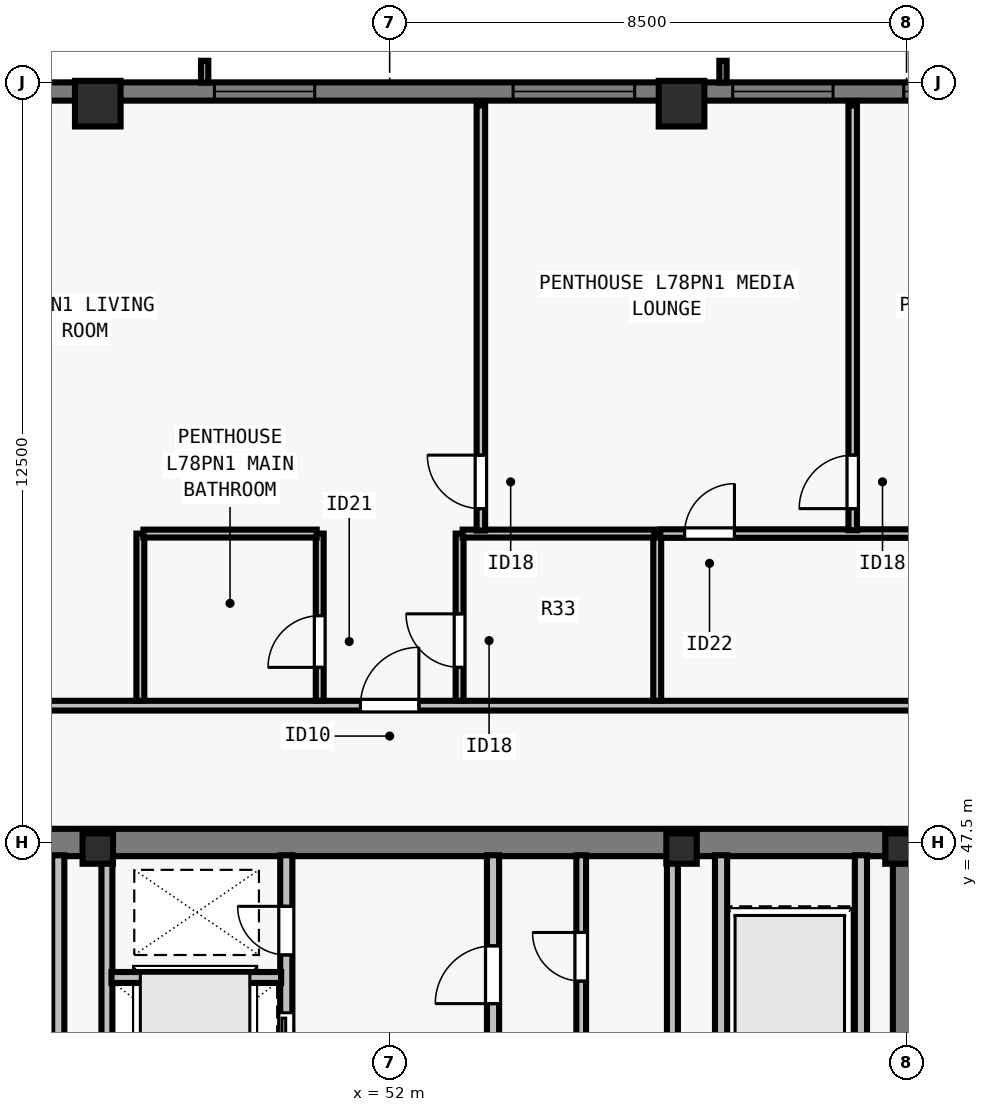
"""IFC4 building model, lengths in metres.
Left out: names, types, materials, properties, quantities, classifications, styles, units other than length and angle.
Written with IfcOpenShell. Run it as: python <this file> out.ifc"""

import sys

from ifc_helpers import new_model, si_unit, direction, frame, frame_2d, origin, origin_2d, place, context, subcontext, project, spatial, rectangle, i_section, extrude, element, fill, save


model = new_model("IFC4")
c1 = context("Model", 3, precision=1e-05, world=origin(), true_north=direction((0.0, 1.0)))
c2 = subcontext(c1, "Body", "Model", "MODEL_VIEW")
j1 = project(units=[si_unit("LENGTHUNIT", "METRE"), si_unit("PLANEANGLEUNIT", "RADIAN")], contexts=[c1])
p1 = place(None, origin())
s1 = spatial("IfcSite", under=j1, at=p1, CompositionType="ELEMENT")
p2 = place(p1, origin())
s2 = spatial("IfcBuilding", under=s1, at=p2, CompositionType="ELEMENT")
p3 = place(p2, frame((0.0, 0.0, 284.0)))
s3 = spatial("IfcBuildingStorey", under=s2, at=p3, CompositionType="ELEMENT", Elevation=284.0)
for number, where, z_axis, x_axis in (
    (1, (47.2, 47.4, 0.0), (0.0, 0.0, 1.0), (1.0, 0.0, 0.0)),
    (2, (56.8, 47.4, 0.0), (0.0, 0.0, 1.0), (1.0, 0.0, 0.0)),
    (3, (60.4, 47.4, 0.0), (0.0, 0.0, 1.0), (1.0, 0.0, 0.0)),
):
    element("IfcColumn", number, at=place(p3, frame(where, z_axis=z_axis, x_axis=x_axis)), inside=s3, PredefinedType="COLUMN", context=c2, shape_type="SweptSolid", body=[
        extrude(i_section(OverallWidth=0.5, OverallDepth=0.5, WebThickness=0.028, FlangeThickness=0.045, at=origin_2d()), origin(), (0.0, 0.0, 1.0), 3.5),
    ])
for number, where, z_axis, x_axis in (
    (4, (56.8, 59.65, 0.0), (0.0, 0.0, 1.0), (1.0, 0.0, 0.0)),
    (5, (47.2, 59.65, 0.0), (0.0, 0.0, 1.0), (1.0, 0.0, 0.0)),
):
    element("IfcColumn", number, at=place(p3, frame(where, z_axis=z_axis, x_axis=x_axis)), inside=s3, PredefinedType="COLUMN", context=c2, shape_type="SweptSolid", body=[
        extrude(rectangle(XDim=0.75, YDim=0.75, at=origin_2d()), origin(), (0.0, 0.0, 1.0), 3.5),
    ])
p4 = place(p3, frame((36.5, 59.85, 0.0), z_axis=(0.0, 0.0, 1.0), x_axis=(1.0, 0.0, 0.0)))
e6 = element("IfcWall", 6, at=p4, inside=s3, PredefinedType="SOLIDWALL", context=c2, shape_type="SweptSolid", body=[
    extrude(rectangle(XDim=30.722, YDim=0.3, at=frame_2d((15.361, 0.0))), origin(), (0.0, 0.0, 1.0), 3.29),
])
p5 = place(p4, frame((4.944, 0.0, 0.8)))
e7 = element("IfcOpeningElement", 7, at=p5, cuts=e6, PredefinedType="OPENING", context=c2, shape_type="SweptSolid", body=[
    extrude(rectangle(XDim=1.65, YDim=1.758, at=frame_2d((0.825, 0.879))), frame((0.0, 0.16, 0.0), z_axis=(0.0, -1.0, 0.0), x_axis=(1.0, 0.0, 0.0)), (0.0, 0.0, 1.0), 0.32),
])
p6 = place(p4, frame((7.756, 0.0, 0.8)))
e8 = element("IfcOpeningElement", 8, at=p6, cuts=e6, PredefinedType="OPENING", context=c2, shape_type="SweptSolid", body=[
    extrude(rectangle(XDim=2.0, YDim=1.758, at=frame_2d((1.0, 0.879))), frame((0.0, 0.16, 0.0), z_axis=(0.0, -1.0, 0.0), x_axis=(1.0, 0.0, 0.0)), (0.0, 0.0, 1.0), 0.32),
])
p7 = place(p4, frame((12.617, 0.0, 0.8)))
e9 = element("IfcOpeningElement", 9, at=p7, cuts=e6, PredefinedType="OPENING", context=c2, shape_type="SweptSolid", body=[
    extrude(rectangle(XDim=1.65, YDim=1.758, at=frame_2d((0.825, 0.879))), frame((0.0, 0.16, 0.0), z_axis=(0.0, -1.0, 0.0), x_axis=(1.0, 0.0, 0.0)), (0.0, 0.0, 1.0), 0.32),
])
p8 = place(p4, frame((17.53, 0.0, 0.8)))
e10 = element("IfcOpeningElement", 10, at=p8, cuts=e6, PredefinedType="OPENING", context=c2, shape_type="SweptSolid", body=[
    extrude(rectangle(XDim=2.0, YDim=1.758, at=frame_2d((1.0, 0.879))), frame((0.0, 0.16, 0.0), z_axis=(0.0, -1.0, 0.0), x_axis=(1.0, 0.0, 0.0)), (0.0, 0.0, 1.0), 0.32),
])
p9 = place(p4, frame((21.142, 0.0, 0.8)))
e11 = element("IfcOpeningElement", 11, at=p9, cuts=e6, PredefinedType="OPENING", context=c2, shape_type="SweptSolid", body=[
    extrude(rectangle(XDim=1.65, YDim=1.758, at=frame_2d((0.825, 0.879))), frame((0.0, 0.16, 0.0), z_axis=(0.0, -1.0, 0.0), x_axis=(1.0, 0.0, 0.0)), (0.0, 0.0, 1.0), 0.32),
])
p10 = place(p4, frame((23.954, 0.0, 0.8)))
e12 = element("IfcOpeningElement", 12, at=p10, cuts=e6, PredefinedType="OPENING", context=c2, shape_type="SweptSolid", body=[
    extrude(rectangle(XDim=2.0, YDim=1.758, at=frame_2d((1.0, 0.879))), frame((0.0, 0.16, 0.0), z_axis=(0.0, -1.0, 0.0), x_axis=(1.0, 0.0, 0.0)), (0.0, 0.0, 1.0), 0.32),
])
p11 = place(p3, frame((43.275, 47.5, 0.0), z_axis=(0.0, 0.0, 1.0), x_axis=(1.0, 0.0, 0.0)))
e13 = element("IfcWall", 13, at=p11, inside=s3, PredefinedType="SHEAR", context=c2, shape_type="SweptSolid", body=[
    extrude(rectangle(XDim=17.45, YDim=0.45, at=frame_2d((8.725, 0.0))), origin(), (0.0, 0.0, 1.0), 3.29),
])
p12 = place(p3, frame((60.5, 40.8, 0.0), z_axis=(0.0, 0.0, 1.0), x_axis=(0.0, 1.0, 0.0)))
e14 = element("IfcWall", 14, at=p12, inside=s3, PredefinedType="SHEAR", context=c2, shape_type="SweptSolid", body=[
    extrude(rectangle(XDim=6.485, YDim=0.45, at=frame_2d((3.242, 0.0))), origin(), (0.0, 0.0, 1.0), 3.29),
])
p13 = place(p3, frame((50.3, 40.585, 0.0), z_axis=(0.0, 0.0, 1.0), x_axis=(0.0, 1.0, 0.0)))
e15 = element("IfcWall", 15, at=p13, inside=s3, PredefinedType="SOLIDWALL", context=c2, shape_type="SweptSolid", body=[
    extrude(rectangle(XDim=6.705, YDim=0.2, at=frame_2d((3.353, 0.0))), origin(), (0.0, 0.0, 1.0), 3.29),
])
p14 = place(p13, frame((0.515, 0.0, 0.0)))
e16 = element("IfcOpeningElement", 16, at=p14, cuts=e15, PredefinedType="OPENING", context=c2, shape_type="SweptSolid", body=[
    extrude(rectangle(XDim=1.1, YDim=2.2, at=frame_2d((0.55, 1.1))), frame((0.0, 0.11, 0.0), z_axis=(0.0, -1.0, 0.0), x_axis=(1.0, 0.0, 0.0)), (0.0, 0.0, 1.0), 0.22),
])
p15 = place(p13, frame((3.015, 0.0, 0.0)))
e17 = element("IfcOpeningElement", 17, at=p15, cuts=e15, PredefinedType="OPENING", context=c2, shape_type="SweptSolid", body=[
    extrude(rectangle(XDim=1.1, YDim=2.2, at=frame_2d((0.55, 1.1))), frame((0.0, 0.11, 0.0), z_axis=(0.0, -1.0, 0.0), x_axis=(1.0, 0.0, 0.0)), (0.0, 0.0, 1.0), 0.22),
])
p16 = place(p13, frame((5.065, 0.0, 0.0)))
e18 = element("IfcOpeningElement", 18, at=p16, cuts=e15, PredefinedType="OPENING", context=c2, shape_type="SweptSolid", body=[
    extrude(rectangle(XDim=0.8, YDim=2.08, at=frame_2d((0.4, 1.04))), frame((0.0, 0.11, 0.0), z_axis=(0.0, -1.0, 0.0), x_axis=(1.0, 0.0, 0.0)), (0.0, 0.0, 1.0), 0.22),
])
p17 = place(p3, frame((53.7, 40.585, 0.0), z_axis=(0.0, 0.0, 1.0), x_axis=(0.0, 1.0, 0.0)))
e19 = element("IfcWall", 19, at=p17, inside=s3, PredefinedType="SOLIDWALL", context=c2, shape_type="SweptSolid", body=[
    extrude(rectangle(XDim=6.705, YDim=0.2, at=frame_2d((3.353, 0.0))), origin(), (0.0, 0.0, 1.0), 3.29),
])
p18 = place(p17, frame((0.195, 0.0, 0.0)))
e20 = element("IfcOpeningElement", 20, at=p18, cuts=e19, PredefinedType="OPENING", context=c2, shape_type="SweptSolid", body=[
    extrude(rectangle(XDim=0.8, YDim=2.08, at=frame_2d((0.4, 1.04))), frame((0.0, 0.11, 0.0), z_axis=(0.0, -1.0, 0.0), x_axis=(1.0, 0.0, 0.0)), (0.0, 0.0, 1.0), 0.22),
])
p19 = place(p17, frame((1.865, 0.0, 0.0)))
e21 = element("IfcOpeningElement", 21, at=p19, cuts=e19, PredefinedType="OPENING", context=c2, shape_type="SweptSolid", body=[
    extrude(rectangle(XDim=1.1, YDim=2.2, at=frame_2d((0.55, 1.1))), frame((0.0, 0.11, 0.0), z_axis=(0.0, -1.0, 0.0), x_axis=(1.0, 0.0, 0.0)), (0.0, 0.0, 1.0), 0.22),
])
p20 = place(p17, frame((4.265, 0.0, 0.0)))
e22 = element("IfcOpeningElement", 22, at=p20, cuts=e19, PredefinedType="OPENING", context=c2, shape_type="SweptSolid", body=[
    extrude(rectangle(XDim=0.95, YDim=2.12, at=frame_2d((0.475, 1.06))), frame((0.0, 0.11, 0.0), z_axis=(0.0, -1.0, 0.0), x_axis=(1.0, 0.0, 0.0)), (0.0, 0.0, 1.0), 0.22),
])
for number, where, z_axis, x_axis in (
    (23, (46.55, 43.735, 0.0), (0.0, 0.0, 1.0), (0.0, 1.0, 0.0)),
    (24, (57.45, 43.735, 0.0), (0.0, 0.0, 1.0), (0.0, 1.0, 0.0)),
    (25, (59.75, 43.735, 0.0), (0.0, 0.0, 1.0), (0.0, 1.0, 0.0)),
):
    element("IfcWall", number, at=place(p3, frame(where, z_axis=z_axis, x_axis=x_axis)), inside=s3, PredefinedType="SOLIDWALL", context=c2, shape_type="SweptSolid", body=[
        extrude(rectangle(XDim=3.555, YDim=0.2, at=frame_2d((1.777, 0.0))), origin(), (0.0, 0.0, 1.0), 3.29),
    ])
p21 = place(p3, frame((47.35, 43.735, 0.0), z_axis=(0.0, 0.0, 1.0), x_axis=(0.0, 1.0, 0.0)))
e26 = element("IfcWall", 26, at=p21, inside=s3, PredefinedType="SOLIDWALL", context=c2, shape_type="SweptSolid", body=[
    extrude(rectangle(XDim=3.555, YDim=0.18, at=frame_2d((1.777, 0.0))), origin(), (0.0, 0.0, 1.0), 3.29),
])
p22 = place(p3, frame((47.425, 45.28, 0.0), z_axis=(0.0, 0.0, 1.0), x_axis=(1.0, 0.0, 0.0)))
e27 = element("IfcWall", 27, at=p22, inside=s3, PredefinedType="SOLIDWALL", context=c2, shape_type="SweptSolid", body=[
    extrude(rectangle(XDim=2.79, YDim=0.18, at=frame_2d((1.395, 0.0))), origin(), (0.0, 0.0, 1.0), 3.29),
])
p23 = place(p3, frame((56.65, 43.735, 0.0), z_axis=(0.0, 0.0, 1.0), x_axis=(0.0, 1.0, 0.0)))
e28 = element("IfcWall", 28, at=p23, inside=s3, PredefinedType="SOLIDWALL", context=c2, shape_type="SweptSolid", body=[
    extrude(rectangle(XDim=3.555, YDim=0.18, at=frame_2d((1.777, 0.0))), origin(), (0.0, 0.0, 1.0), 3.29),
])
p24 = place(p3, frame((55.15, 44.195, 0.0), z_axis=(0.0, 0.0, 1.0), x_axis=(0.0, 1.0, 0.0)))
e29 = element("IfcWall", 29, at=p24, inside=s3, PredefinedType="PARTITIONING", context=c2, shape_type="SweptSolid", body=[
    extrude(rectangle(XDim=3.095, YDim=0.16, at=frame_2d((1.547, 0.0))), origin(), (0.0, 0.0, 1.0), 3.29),
])
p25 = place(p24, frame((1.025, 0.0, 0.0)))
e30 = element("IfcOpeningElement", 30, at=p25, cuts=e29, PredefinedType="OPENING", context=c2, shape_type="SweptSolid", body=[
    extrude(rectangle(XDim=0.8, YDim=2.1, at=frame_2d((0.4, 1.05))), frame((0.0, 0.09, 0.0), z_axis=(0.0, -1.0, 0.0), x_axis=(1.0, 0.0, 0.0)), (0.0, 0.0, 1.0), 0.18),
])
p26 = place(p3, frame((31.285, 49.75, 0.0), z_axis=(0.0, 0.0, 1.0), x_axis=(1.0, 0.0, 0.0)))
e31 = element("IfcWall", 31, at=p26, inside=s3, PredefinedType="PARTITIONING", context=c2, shape_type="SweptSolid", body=[
    extrude(rectangle(XDim=41.43, YDim=0.16, at=frame_2d((20.715, 0.0))), origin(), (0.0, 0.0, 1.0), 3.009),
])
p27 = place(p26, frame((20.235, 0.0, 0.0)))
e32 = element("IfcOpeningElement", 32, at=p27, cuts=e31, PredefinedType="OPENING", context=c2, shape_type="SweptSolid", body=[
    extrude(rectangle(XDim=0.96, YDim=2.18, at=frame_2d((0.48, 1.09))), frame((0.0, 0.09, 0.0), z_axis=(0.0, -1.0, 0.0), x_axis=(1.0, 0.0, 0.0)), (0.0, 0.0, 1.0), 0.18),
])
p28 = place(p3, frame((47.9, 49.83, 0.0), z_axis=(0.0, 0.0, 1.0), x_axis=(0.0, 1.0, 0.0)))
e33 = element("IfcWall", 33, at=p28, inside=s3, PredefinedType="PLUMBINGWALL", context=c2, shape_type="SweptSolid", body=[
    extrude(rectangle(XDim=2.75, YDim=0.13, at=frame_2d((1.375, 0.0))), origin(), (0.0, 0.0, 1.0), 3.29),
])
p29 = place(p3, frame((50.85, 49.83, 0.0), z_axis=(0.0, 0.0, 1.0), x_axis=(0.0, 1.0, 0.0)))
e34 = element("IfcWall", 34, at=p29, inside=s3, PredefinedType="PLUMBINGWALL", context=c2, shape_type="SweptSolid", body=[
    extrude(rectangle(XDim=2.75, YDim=0.13, at=frame_2d((1.375, 0.0))), origin(), (0.0, 0.0, 1.0), 3.009),
])
p30 = place(p29, frame((0.55, 0.0, 0.0)))
e35 = element("IfcOpeningElement", 35, at=p30, cuts=e34, PredefinedType="OPENING", context=c2, shape_type="SweptSolid", body=[
    extrude(rectangle(XDim=0.85, YDim=2.08, at=frame_2d((0.425, 1.04))), frame((0.0, 0.075, 0.0), z_axis=(0.0, -1.0, 0.0), x_axis=(1.0, 0.0, 0.0)), (0.0, 0.0, 1.0), 0.15),
])
p31 = place(p3, frame((47.95, 52.58, 0.0), z_axis=(0.0, 0.0, 1.0), x_axis=(1.0, 0.0, 0.0)))
e36 = element("IfcWall", 36, at=p31, inside=s3, PredefinedType="PLUMBINGWALL", context=c2, shape_type="SweptSolid", body=[
    extrude(rectangle(XDim=2.85, YDim=0.13, at=frame_2d((1.425, 0.0))), origin(), (0.0, 0.0, 1.0), 3.29),
])
p32 = place(p3, frame((56.4, 49.83, 0.0), z_axis=(0.0, 0.0, 1.0), x_axis=(0.0, 1.0, 0.0)))
e37 = element("IfcWall", 37, at=p32, inside=s3, PredefinedType="PLUMBINGWALL", context=c2, shape_type="SweptSolid", body=[
    extrude(rectangle(XDim=2.75, YDim=0.13, at=frame_2d((1.375, 0.0))), origin(), (0.0, 0.0, 1.0), 3.29),
])
p33 = place(p3, frame((53.15, 49.83, 0.0), z_axis=(0.0, 0.0, 1.0), x_axis=(0.0, 1.0, 0.0)))
e38 = element("IfcWall", 38, at=p33, inside=s3, PredefinedType="PLUMBINGWALL", context=c2, shape_type="SweptSolid", body=[
    extrude(rectangle(XDim=2.75, YDim=0.13, at=frame_2d((1.375, 0.0))), origin(), (0.0, 0.0, 1.0), 3.29),
])
p34 = place(p33, frame((0.55, 0.0, 0.0)))
e39 = element("IfcOpeningElement", 39, at=p34, cuts=e38, PredefinedType="OPENING", context=c2, shape_type="SweptSolid", body=[
    extrude(rectangle(XDim=0.88, YDim=2.1, at=frame_2d((0.44, 1.05))), frame((0.0, 0.075, 0.0), z_axis=(0.0, -1.0, 0.0), x_axis=(1.0, 0.0, 0.0)), (0.0, 0.0, 1.0), 0.15),
])
p35 = place(p3, frame((53.2, 52.58, 0.0), z_axis=(0.0, 0.0, 1.0), x_axis=(1.0, 0.0, 0.0)))
e40 = element("IfcWall", 40, at=p35, inside=s3, PredefinedType="PLUMBINGWALL", context=c2, shape_type="SweptSolid", body=[
    extrude(rectangle(XDim=3.15, YDim=0.13, at=frame_2d((1.575, 0.0))), origin(), (0.0, 0.0, 1.0), 3.29),
])
p36 = place(p3, frame((56.45, 52.58, 0.0), z_axis=(0.0, 0.0, 1.0), x_axis=(1.0, 0.0, 0.0)))
e41 = element("IfcWall", 41, at=p36, inside=s3, PredefinedType="PARTITIONING", context=c2, shape_type="SweptSolid", body=[
    extrude(rectangle(XDim=16.18, YDim=0.14, at=frame_2d((8.09, 0.0))), origin(), (0.0, 0.0, 1.0), 3.009),
])
p37 = place(p36, frame((0.4, 0.0, 0.0)))
e42 = element("IfcOpeningElement", 42, at=p37, cuts=e41, PredefinedType="OPENING", context=c2, shape_type="SweptSolid", body=[
    extrude(rectangle(XDim=0.82, YDim=2.1, at=frame_2d((0.41, 1.05))), frame((0.0, 0.08, 0.0), z_axis=(0.0, -1.0, 0.0), x_axis=(1.0, 0.0, 0.0)), (0.0, 0.0, 1.0), 0.16),
])
p38 = place(p3, frame((53.5, 52.63, 0.0), z_axis=(0.0, 0.0, 1.0), x_axis=(0.0, 1.0, 0.0)))
e43 = element("IfcWall", 43, at=p38, inside=s3, PredefinedType="PARTITIONING", context=c2, shape_type="SweptSolid", body=[
    extrude(rectangle(XDim=6.99, YDim=0.14, at=frame_2d((3.495, 0.0))), origin(), (0.0, 0.0, 1.0), 3.009),
])
p39 = place(p38, frame((0.36, 0.0, 0.0)))
e44 = element("IfcOpeningElement", 44, at=p39, cuts=e43, PredefinedType="OPENING", context=c2, shape_type="SweptSolid", body=[
    extrude(rectangle(XDim=0.88, YDim=2.1, at=frame_2d((0.44, 1.05))), frame((0.0, 0.08, 0.0), z_axis=(0.0, -1.0, 0.0), x_axis=(1.0, 0.0, 0.0)), (0.0, 0.0, 1.0), 0.16),
])
p40 = place(p3, frame((59.615, 52.635, 0.0), z_axis=(0.0, 0.0, 1.0), x_axis=(0.0, 1.0, 0.0)))
e45 = element("IfcWall", 45, at=p40, inside=s3, PredefinedType="PARTITIONING", context=c2, shape_type="SweptSolid", body=[
    extrude(rectangle(XDim=6.985, YDim=0.14, at=frame_2d((3.493, 0.0))), origin(), (0.0, 0.0, 1.0), 3.29),
])
p41 = place(p40, frame((0.355, 0.0, 0.0)))
e46 = element("IfcOpeningElement", 46, at=p41, cuts=e45, PredefinedType="OPENING", context=c2, shape_type="SweptSolid", body=[
    extrude(rectangle(XDim=0.88, YDim=2.1, at=frame_2d((0.44, 1.05))), frame((0.0, 0.08, 0.0), z_axis=(0.0, -1.0, 0.0), x_axis=(1.0, 0.0, 0.0)), (0.0, 0.0, 1.0), 0.16),
])
p42 = place(p7, origin())
e47 = element("IfcWindow", 47, at=p42, inside=s3, PartitioningType="SINGLE_PANEL", PredefinedType="WINDOW", context=c2, shape_type="SweptSolid", body=[
    extrude(rectangle(XDim=1.65, YDim=1.758, at=frame_2d((0.825, 0.879))), frame((0.0, -0.05, 0.0), z_axis=(0.0, -1.0, 0.0), x_axis=(1.0, 0.0, 0.0)), (0.0, 0.0, 1.0), 0.06),
])
fill(e9, e47)
p43 = place(p8, origin())
e48 = element("IfcWindow", 48, at=p43, inside=s3, PartitioningType="SINGLE_PANEL", PredefinedType="WINDOW", context=c2, shape_type="SweptSolid", body=[
    extrude(rectangle(XDim=2.0, YDim=1.758, at=frame_2d((1.0, 0.879))), frame((0.0, -0.05, 0.0), z_axis=(0.0, -1.0, 0.0), x_axis=(1.0, 0.0, 0.0)), (0.0, 0.0, 1.0), 0.06),
])
fill(e10, e48)
p44 = place(p9, origin())
e49 = element("IfcWindow", 49, at=p44, inside=s3, PartitioningType="SINGLE_PANEL", PredefinedType="WINDOW", context=c2, shape_type="SweptSolid", body=[
    extrude(rectangle(XDim=1.65, YDim=1.758, at=frame_2d((0.825, 0.879))), frame((0.0, -0.05, 0.0), z_axis=(0.0, -1.0, 0.0), x_axis=(1.0, 0.0, 0.0)), (0.0, 0.0, 1.0), 0.06),
])
fill(e11, e49)
p45 = place(p10, origin())
e50 = element("IfcWindow", 50, at=p45, inside=s3, PartitioningType="SINGLE_PANEL", PredefinedType="WINDOW", context=c2, shape_type="SweptSolid", body=[
    extrude(rectangle(XDim=2.0, YDim=1.758, at=frame_2d((1.0, 0.879))), frame((0.0, -0.05, 0.0), z_axis=(0.0, -1.0, 0.0), x_axis=(1.0, 0.0, 0.0)), (0.0, 0.0, 1.0), 0.06),
])
fill(e12, e50)
p46 = place(p15, origin())
e51 = element("IfcDoor", 51, at=p46, inside=s3, OperationType="SLIDING_TO_LEFT", PredefinedType="DOOR", context=c2, shape_type="SweptSolid", body=[
    extrude(rectangle(XDim=1.1, YDim=2.2, at=frame_2d((0.55, 1.1))), frame((0.0, 0.025, 0.0), z_axis=(0.0, -1.0, 0.0), x_axis=(1.0, 0.0, 0.0)), (0.0, 0.0, 1.0), 0.05),
])
fill(e17, e51)
p47 = place(p16, origin())
e52 = element("IfcDoor", 52, at=p47, inside=s3, OperationType="SINGLE_SWING_RIGHT", PredefinedType="DOOR", context=c2, shape_type="SweptSolid", body=[
    extrude(rectangle(XDim=0.8, YDim=2.08, at=frame_2d((0.4, 1.04))), frame((0.0, 0.025, 0.0), z_axis=(0.0, -1.0, 0.0), x_axis=(1.0, 0.0, 0.0)), (0.0, 0.0, 1.0), 0.05),
])
fill(e18, e52)
p48 = place(p20, origin())
e53 = element("IfcDoor", 53, at=p48, inside=s3, OperationType="SINGLE_SWING_LEFT", PredefinedType="DOOR", context=c2, shape_type="SweptSolid", body=[
    extrude(rectangle(XDim=0.95, YDim=2.12, at=frame_2d((0.475, 1.06))), frame((0.0, 0.025, 0.0), z_axis=(0.0, -1.0, 0.0), x_axis=(1.0, 0.0, 0.0)), (0.0, 0.0, 1.0), 0.05),
])
fill(e22, e53)
p49 = place(p25, origin())
e54 = element("IfcDoor", 54, at=p49, inside=s3, OperationType="SINGLE_SWING_RIGHT", PredefinedType="DOOR", context=c2, shape_type="SweptSolid", body=[
    extrude(rectangle(XDim=0.8, YDim=2.1, at=frame_2d((0.4, 1.05))), frame((0.0, 0.025, 0.0), z_axis=(0.0, -1.0, 0.0), x_axis=(1.0, 0.0, 0.0)), (0.0, 0.0, 1.0), 0.05),
])
fill(e30, e54)
p50 = place(p30, origin())
e55 = element("IfcDoor", 55, at=p50, inside=s3, OperationType="SINGLE_SWING_LEFT", PredefinedType="DOOR", context=c2, shape_type="SweptSolid", body=[
    extrude(rectangle(XDim=0.85, YDim=2.08, at=frame_2d((0.425, 1.04))), frame((0.0, 0.025, 0.0), z_axis=(0.0, -1.0, 0.0), x_axis=(1.0, 0.0, 0.0)), (0.0, 0.0, 1.0), 0.05),
])
fill(e35, e55)
p51 = place(p34, origin())
e56 = element("IfcDoor", 56, at=p51, inside=s3, OperationType="SINGLE_SWING_RIGHT", PredefinedType="DOOR", context=c2, shape_type="SweptSolid", body=[
    extrude(rectangle(XDim=0.88, YDim=2.1, at=frame_2d((0.44, 1.05))), frame((0.0, 0.025, 0.0), z_axis=(0.0, -1.0, 0.0), x_axis=(1.0, 0.0, 0.0)), (0.0, 0.0, 1.0), 0.05),
])
fill(e39, e56)
p52 = place(p37, origin())
e57 = element("IfcDoor", 57, at=p52, inside=s3, OperationType="SINGLE_SWING_RIGHT", PredefinedType="DOOR", context=c2, shape_type="SweptSolid", body=[
    extrude(rectangle(XDim=0.82, YDim=2.1, at=frame_2d((0.41, 1.05))), frame((0.0, 0.025, 0.0), z_axis=(0.0, -1.0, 0.0), x_axis=(1.0, 0.0, 0.0)), (0.0, 0.0, 1.0), 0.05),
])
fill(e42, e57)
p53 = place(p39, origin())
e58 = element("IfcDoor", 58, at=p53, inside=s3, OperationType="SINGLE_SWING_RIGHT", PredefinedType="DOOR", context=c2, shape_type="SweptSolid", body=[
    extrude(rectangle(XDim=0.88, YDim=2.1, at=frame_2d((0.44, 1.05))), frame((0.0, 0.025, 0.0), z_axis=(0.0, -1.0, 0.0), x_axis=(1.0, 0.0, 0.0)), (0.0, 0.0, 1.0), 0.05),
])
fill(e44, e58)
p54 = place(p41, origin())
e59 = element("IfcDoor", 59, at=p54, inside=s3, OperationType="SINGLE_SWING_LEFT", PredefinedType="DOOR", context=c2, shape_type="SweptSolid", body=[
    extrude(rectangle(XDim=0.88, YDim=2.1, at=frame_2d((0.44, 1.05))), frame((0.0, 0.025, 0.0), z_axis=(0.0, -1.0, 0.0), x_axis=(1.0, 0.0, 0.0)), (0.0, 0.0, 1.0), 0.05),
])
fill(e46, e59)
p55 = place(p27, origin())
e60 = element("IfcDoor", 60, at=p55, inside=s3, OperationType="SINGLE_SWING_RIGHT", PredefinedType="DOOR", context=c2, shape_type="SweptSolid", body=[
    extrude(rectangle(XDim=0.96, YDim=2.18, at=frame_2d((0.48, 1.09))), frame((0.0, 0.025, 0.0), z_axis=(0.0, -1.0, 0.0), x_axis=(1.0, 0.0, 0.0)), (0.0, 0.0, 1.0), 0.05),
])
fill(e32, e60)
save(model, sys.argv[1])
